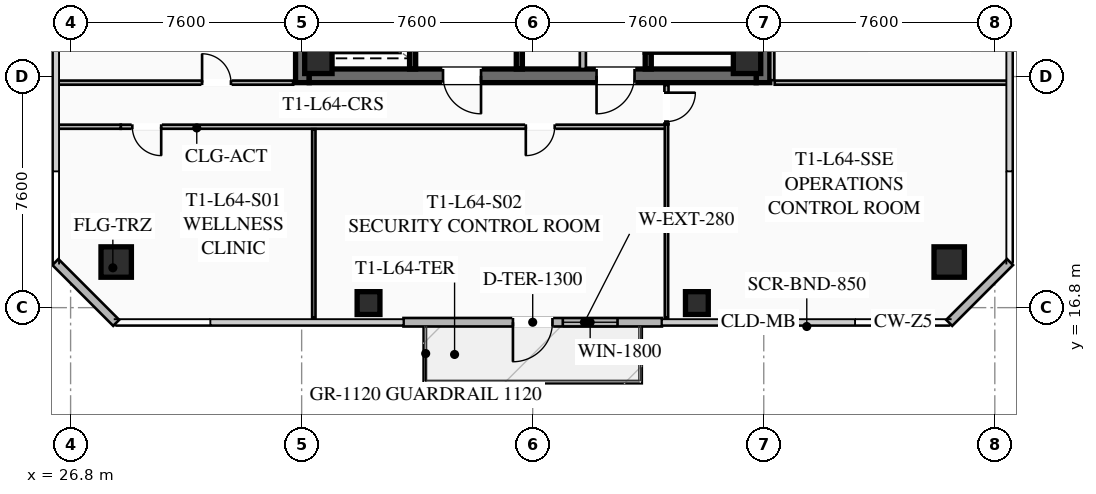
"""IFC4 building model, lengths in metres.
Left out: names, types, materials, properties, quantities, classifications, styles, units other than length and angle.
Written with IfcOpenShell. Run it as: python <this file> out.ifc"""

import sys

from ifc_helpers import new_model, si_unit, direction, frame, frame_2d, origin, origin_2d, place, context, subcontext, project, spatial, rectangle, hollow_rectangle, extrude, element, fill, save


model = new_model("IFC4")
c1 = context("Model", 3, precision=1e-05, world=origin(), true_north=direction((0.0, 1.0)))
c2 = subcontext(c1, "Body", "Model", "MODEL_VIEW")
j1 = project(units=[si_unit("LENGTHUNIT", "METRE"), si_unit("PLANEANGLEUNIT", "RADIAN")], contexts=[c1])
p1 = place(None, origin())
s1 = spatial("IfcSite", under=j1, at=p1, CompositionType="ELEMENT")
p2 = place(p1, origin())
s2 = spatial("IfcBuilding", under=s1, at=p2, CompositionType="ELEMENT")
p3 = place(p2, frame((0.0, 0.0, 236.15)))
s3 = spatial("IfcBuildingStorey", under=s2, at=p3, CompositionType="ELEMENT", Elevation=236.15)
for number, where, z_axis, x_axis in (
    (1, (34.425, 24.2, 0.0), (0.0, 0.0, 1.0), (0.0, 1.0, 0.0)),
    (2, (49.575, 39.8, 0.0), (0.0, 0.0, 1.0), (0.0, -1.0, 0.0)),
):
    element("IfcWall", number, at=place(p3, frame(where, z_axis=z_axis, x_axis=x_axis)), inside=s3, PredefinedType="SHEAR", context=c2, shape_type="SweptSolid", body=[
        extrude(rectangle(XDim=15.6, YDim=0.45, at=frame_2d((7.8, 0.0))), origin(), (0.0, 0.0, 1.0), 3.55),
    ])
p4 = place(p3, frame((49.35, 24.425, 0.0), z_axis=(0.0, 0.0, 1.0), x_axis=(-1.0, 0.0, 0.0)))
e3 = element("IfcWall", 3, at=p4, inside=s3, PredefinedType="SHEAR", context=c2, shape_type="SweptSolid", body=[
    extrude(rectangle(XDim=14.7, YDim=0.45, at=frame_2d((7.35, 0.0))), origin(), (0.0, 0.0, 1.0), 3.55),
])
p5 = place(p4, frame((9.05, 0.0, 0.0)))
e4 = element("IfcOpeningElement", 4, at=p5, cuts=e3, PredefinedType="OPENING", context=c2, shape_type="SweptSolid", body=[
    extrude(rectangle(XDim=1.25, YDim=2.25, at=frame_2d((0.625, 1.125))), frame((0.0, 0.235, 0.0), z_axis=(0.0, -1.0, 0.0), x_axis=(1.0, 0.0, 0.0)), (0.0, 0.0, 1.0), 0.47),
])
p6 = place(p4, frame((4.0, 0.0, 0.0)))
e5 = element("IfcOpeningElement", 5, at=p6, cuts=e3, PredefinedType="OPENING", context=c2, shape_type="SweptSolid", body=[
    extrude(rectangle(XDim=1.25, YDim=2.25, at=frame_2d((0.625, 1.125))), frame((0.0, 0.235, 0.0), z_axis=(0.0, -1.0, 0.0), x_axis=(1.0, 0.0, 0.0)), (0.0, 0.0, 1.0), 0.47),
])
for number, where, z_axis, x_axis in (
    (6, (34.95, 24.95, 0.0), (0.0, 0.0, 1.0), (1.0, 0.0, 0.0)),
    (7, (49.05, 24.95, 0.0), (0.0, 0.0, 1.0), (1.0, 0.0, 0.0)),
):
    element("IfcColumn", number, at=place(p3, frame(where, z_axis=z_axis, x_axis=x_axis)), inside=s3, PredefinedType="COLUMN", context=c2, shape_type="SweptSolid", body=[
        extrude(hollow_rectangle(XDim=0.9, YDim=0.9, WallThickness=0.04, at=origin_2d()), origin(), (0.0, 0.0, 1.0), 3.37),
    ])
for number, where, z_axis, x_axis in (
    (8, (28.3, 18.3, 0.0), (0.0, 0.0, 1.0), (1.0, 0.0, 0.0)),
    (9, (55.7, 18.3, 0.0), (0.0, 0.0, 1.0), (1.0, 0.0, 0.0)),
):
    element("IfcColumn", number, at=place(p3, frame(where, z_axis=z_axis, x_axis=x_axis)), inside=s3, PredefinedType="COLUMN", context=c2, shape_type="SweptSolid", body=[
        extrude(hollow_rectangle(XDim=1.0, YDim=1.0, WallThickness=0.04, at=origin_2d()), origin(), (0.0, 0.0, 1.0), 3.37),
    ])
for number, where, z_axis, x_axis in (
    (10, (36.6, 16.95, 0.0), (0.0, 0.0, 1.0), (1.0, 0.0, 0.0)),
    (11, (47.4, 16.95, 0.0), (0.0, 0.0, 1.0), (1.0, 0.0, 0.0)),
):
    element("IfcColumn", number, at=place(p3, frame(where, z_axis=z_axis, x_axis=x_axis)), inside=s3, PredefinedType="COLUMN", context=c2, shape_type="SweptSolid", body=[
        extrude(hollow_rectangle(XDim=0.75, YDim=0.75, WallThickness=0.032, at=origin_2d()), origin(), (0.0, 0.0, 1.0), 3.37),
    ])
p7 = place(p3, frame((46.25, 16.32, 0.0), z_axis=(0.0, 0.0, 1.0), x_axis=(-1.0, 0.0, 0.0)))
e12 = element("IfcWall", 12, at=p7, inside=s3, PredefinedType="SOLIDWALL", context=c2, shape_type="SweptSolid", body=[
    extrude(rectangle(XDim=8.5, YDim=0.28, at=frame_2d((4.25, 0.0))), origin(), (0.0, 0.0, 1.0), 3.37),
])
p8 = place(p7, frame((3.6, 0.0, 0.0)))
e13 = element("IfcOpeningElement", 13, at=p8, cuts=e12, PredefinedType="OPENING", context=c2, shape_type="SweptSolid", body=[
    extrude(rectangle(XDim=1.3, YDim=2.15, at=frame_2d((0.65, 1.075))), frame((0.0, 0.15, 0.0), z_axis=(0.0, -1.0, 0.0), x_axis=(1.0, 0.0, 0.0)), (0.0, 0.0, 1.0), 0.3),
])
p9 = place(p7, frame((1.46, 0.0, 0.85)))
e14 = element("IfcOpeningElement", 14, at=p9, cuts=e12, PredefinedType="OPENING", context=c2, shape_type="SweptSolid", body=[
    extrude(rectangle(XDim=1.8, YDim=1.92, at=frame_2d((0.9, 0.96))), frame((0.0, 0.15, 0.0), z_axis=(0.0, -1.0, 0.0), x_axis=(1.0, 0.0, 0.0)), (0.0, 0.0, 1.0), 0.3),
])
for number, where, z_axis, x_axis in (
    (15, (28.3, 16.3, 0.0), (0.0, 0.0, 1.0), (-0.707, 0.707, 0.0)),
    (16, (57.7, 18.3, 0.0), (0.0, 0.0, 1.0), (-0.707, -0.707, 0.0)),
):
    element("IfcWall", number, at=place(p3, frame(where, z_axis=z_axis, x_axis=x_axis)), inside=s3, PredefinedType="SOLIDWALL", context=c2, shape_type="SweptSolid", body=[
        extrude(rectangle(XDim=2.828, YDim=0.28, at=frame_2d((1.414, 0.0))), origin(), (0.0, 0.0, 1.0), 3.37),
    ])
p10 = place(p3, frame((45.8, 32.8, 0.0), z_axis=(0.0, 0.0, 1.0), x_axis=(0.0, -1.0, 0.0)))
e17 = element("IfcWall", 17, at=p10, inside=s3, PredefinedType="SHEAR", context=c2, shape_type="SweptSolid", body=[
    extrude(rectangle(XDim=8.15, YDim=0.2, at=frame_2d((4.075, 0.0))), origin(), (0.0, 0.0, 1.0), 3.37),
])
p11 = place(p10, frame((0.45, 0.0, 0.0)))
e18 = element("IfcOpeningElement", 18, at=p11, cuts=e17, PredefinedType="OPENING", context=c2, shape_type="SweptSolid", body=[
    extrude(rectangle(XDim=1.15, YDim=2.2, at=frame_2d((0.575, 1.1))), frame((0.0, 0.11, 0.0), z_axis=(0.0, -1.0, 0.0), x_axis=(1.0, 0.0, 0.0)), (0.0, 0.0, 1.0), 0.22),
])
p12 = place(p3, frame((41.56, 24.65, 0.0), z_axis=(0.0, 0.0, 1.0), x_axis=(0.0, 1.0, 0.0)))
e19 = element("IfcWall", 19, at=p12, inside=s3, PredefinedType="SHEAR", context=c2, shape_type="SweptSolid", body=[
    extrude(rectangle(XDim=14.7, YDim=0.2, at=frame_2d((7.35, 0.0))), origin(), (0.0, 0.0, 1.0), 3.37),
])
p13 = place(p3, frame((38.05, 24.65, 0.0), z_axis=(0.0, 0.0, 1.0), x_axis=(0.0, 1.0, 0.0)))
e20 = element("IfcWall", 20, at=p13, inside=s3, PredefinedType="SHEAR", context=c2, shape_type="SweptSolid", body=[
    extrude(rectangle(XDim=6.55, YDim=0.2, at=frame_2d((3.275, 0.0))), origin(), (0.0, 0.0, 1.0), 3.37),
])
p14 = place(p13, frame((4.975, 0.0, 0.0)))
e21 = element("IfcOpeningElement", 21, at=p14, cuts=e20, PredefinedType="OPENING", context=c2, shape_type="SweptSolid", body=[
    extrude(rectangle(XDim=1.3, YDim=2.25, at=frame_2d((0.65, 1.125))), frame((0.0, 0.11, 0.0), z_axis=(0.0, -1.0, 0.0), x_axis=(1.0, 0.0, 0.0)), (0.0, 0.0, 1.0), 0.22),
])
p15 = place(p13, frame((2.975, 0.0, 0.0)))
e22 = element("IfcOpeningElement", 22, at=p15, cuts=e20, PredefinedType="OPENING", context=c2, shape_type="SweptSolid", body=[
    extrude(rectangle(XDim=1.3, YDim=2.25, at=frame_2d((0.65, 1.125))), frame((0.0, 0.11, 0.0), z_axis=(0.0, -1.0, 0.0), x_axis=(1.0, 0.0, 0.0)), (0.0, 0.0, 1.0), 0.22),
])
p16 = place(p13, frame((0.775, 0.0, 0.0)))
e23 = element("IfcOpeningElement", 23, at=p16, cuts=e20, PredefinedType="OPENING", context=c2, shape_type="SweptSolid", body=[
    extrude(rectangle(XDim=1.3, YDim=2.25, at=frame_2d((0.65, 1.125))), frame((0.0, 0.11, 0.0), z_axis=(0.0, -1.0, 0.0), x_axis=(1.0, 0.0, 0.0)), (0.0, 0.0, 1.0), 0.22),
])
p17 = place(p3, frame((43.65, 24.65, 0.0), z_axis=(0.0, 0.0, 1.0), x_axis=(0.0, 1.0, 0.0)))
e24 = element("IfcWall", 24, at=p17, inside=s3, PredefinedType="SOLIDWALL", context=c2, shape_type="SweptSolid", body=[
    extrude(rectangle(XDim=7.0, YDim=0.2, at=frame_2d((3.5, 0.0))), origin(), (0.0, 0.0, 1.0), 2.723),
])
p18 = place(p17, frame((0.85, 0.0, 0.0)))
e25 = element("IfcOpeningElement", 25, at=p18, cuts=e24, PredefinedType="OPENING", context=c2, shape_type="SweptSolid", body=[
    extrude(rectangle(XDim=0.95, YDim=2.05, at=frame_2d((0.475, 1.025))), frame((0.0, 0.11, 0.0), z_axis=(0.0, -1.0, 0.0), x_axis=(1.0, 0.0, 0.0)), (0.0, 0.0, 1.0), 0.22),
])
p19 = place(p17, frame((4.8, 0.0, 0.0)))
e26 = element("IfcOpeningElement", 26, at=p19, cuts=e24, PredefinedType="OPENING", context=c2, shape_type="SweptSolid", body=[
    extrude(rectangle(XDim=1.05, YDim=2.2, at=frame_2d((0.525, 1.1))), frame((0.0, 0.11, 0.0), z_axis=(0.0, -1.0, 0.0), x_axis=(1.0, 0.0, 0.0)), (0.0, 0.0, 1.0), 0.22),
])
p20 = place(p3, frame((46.4, 22.75, 0.0), z_axis=(0.0, 0.0, 1.0), x_axis=(-1.0, 0.0, 0.0)))
e27 = element("IfcWall", 27, at=p20, inside=s3, PredefinedType="PARTITIONING", context=c2, shape_type="SweptSolid", body=[
    extrude(rectangle(XDim=17.95, YDim=0.135, at=frame_2d((8.975, 0.0))), origin(), (0.0, 0.0, 1.0), 2.723),
])
p21 = place(p20, frame((16.62, 0.0, 0.0)))
e28 = element("IfcOpeningElement", 28, at=p21, cuts=e27, PredefinedType="OPENING", context=c2, shape_type="SweptSolid", body=[
    extrude(rectangle(XDim=0.95, YDim=2.05, at=frame_2d((0.475, 1.025))), frame((0.0, 0.077, 0.0), z_axis=(0.0, -1.0, 0.0), x_axis=(1.0, 0.0, 0.0)), (0.0, 0.0, 1.0), 0.155),
])
p22 = place(p20, frame((3.677, 0.0, 0.0)))
e29 = element("IfcOpeningElement", 29, at=p22, cuts=e27, PredefinedType="OPENING", context=c2, shape_type="SweptSolid", body=[
    extrude(rectangle(XDim=0.95, YDim=2.05, at=frame_2d((0.475, 1.025))), frame((0.0, 0.077, 0.0), z_axis=(0.0, -1.0, 0.0), x_axis=(1.0, 0.0, 0.0)), (0.0, 0.0, 1.0), 0.155),
])
p23 = place(p3, frame((26.32, 22.75, 0.0), z_axis=(0.0, 0.0, 1.0), x_axis=(1.0, 0.0, 0.0)))
e30 = element("IfcWall", 30, at=p23, inside=s3, PredefinedType="PARTITIONING", context=c2, shape_type="SweptSolid", body=[
    extrude(rectangle(XDim=2.13, YDim=0.135, at=frame_2d((1.065, 0.0))), origin(), (0.0, 0.0, 1.0), 2.723),
])
p24 = place(p3, frame((46.4, 24.12, 0.0), z_axis=(0.0, 0.0, 1.0), x_axis=(0.0, -1.0, 0.0)))
e31 = element("IfcWall", 31, at=p24, inside=s3, PredefinedType="PARTITIONING", context=c2, shape_type="SweptSolid", body=[
    extrude(rectangle(XDim=1.29, YDim=0.135, at=frame_2d((0.645, 0.0))), origin(), (0.0, 0.0, 1.0), 2.723),
])
p25 = place(p24, frame((0.25, 0.0, 0.0)))
e32 = element("IfcOpeningElement", 32, at=p25, cuts=e31, PredefinedType="OPENING", context=c2, shape_type="SweptSolid", body=[
    extrude(rectangle(XDim=0.95, YDim=2.05, at=frame_2d((0.475, 1.025))), frame((0.0, 0.077, 0.0), z_axis=(0.0, -1.0, 0.0), x_axis=(1.0, 0.0, 0.0)), (0.0, 0.0, 1.0), 0.155),
])
p26 = place(p3, frame((34.8, 16.47, 0.0), z_axis=(0.0, 0.0, 1.0), x_axis=(0.0, 1.0, 0.0)))
e33 = element("IfcWall", 33, at=p26, inside=s3, PredefinedType="PARTITIONING", context=c2, shape_type="SweptSolid", body=[
    extrude(rectangle(XDim=6.2, YDim=0.11, at=frame_2d((3.1, 0.0))), origin(), (0.0, 0.0, 1.0), 2.723),
])
p27 = place(p3, frame((46.4, 16.47, 0.0), z_axis=(0.0, 0.0, 1.0), x_axis=(0.0, 1.0, 0.0)))
e34 = element("IfcWall", 34, at=p27, inside=s3, PredefinedType="PARTITIONING", context=c2, shape_type="SweptSolid", body=[
    extrude(rectangle(XDim=6.36, YDim=0.11, at=frame_2d((3.18, 0.0))), origin(), (0.0, 0.0, 1.0), 2.723),
])
p28 = place(p3, frame((49.88, 39.72, 0.0), z_axis=(0.0, 0.0, 1.0), x_axis=(0.0, -1.0, 0.0)))
e35 = element("IfcWall", 35, at=p28, inside=s3, PredefinedType="PARTITIONING", context=c2, shape_type="SweptSolid", body=[
    extrude(rectangle(XDim=15.44, YDim=0.135, at=frame_2d((7.72, 0.0))), origin(), (0.0, 0.0, 1.0), 2.723),
])
p29 = place(p3, frame((49.96, 24.2, 0.0), z_axis=(0.0, 0.0, 1.0), x_axis=(1.0, 0.0, 0.0)))
e36 = element("IfcWall", 36, at=p29, inside=s3, PredefinedType="PARTITIONING", context=c2, shape_type="SweptSolid", body=[
    extrude(rectangle(XDim=7.72, YDim=0.135, at=frame_2d((3.86, 0.0))), origin(), (0.0, 0.0, 1.0), 2.723),
])
p30 = place(p3, frame((26.32, 24.2, 0.0), z_axis=(0.0, 0.0, 1.0), x_axis=(1.0, 0.0, 0.0)))
e37 = element("IfcWall", 37, at=p30, inside=s3, PredefinedType="PARTITIONING", context=c2, shape_type="SweptSolid", body=[
    extrude(rectangle(XDim=7.8, YDim=0.135, at=frame_2d((3.9, 0.0))), origin(), (0.0, 0.0, 1.0), 2.723),
])
p31 = place(p30, frame((4.805, 0.0, 0.0)))
e38 = element("IfcOpeningElement", 38, at=p31, cuts=e37, PredefinedType="OPENING", context=c2, shape_type="SweptSolid", body=[
    extrude(rectangle(XDim=0.95, YDim=2.05, at=frame_2d((0.475, 1.025))), frame((0.0, 0.077, 0.0), z_axis=(0.0, -1.0, 0.0), x_axis=(1.0, 0.0, 0.0)), (0.0, 0.0, 1.0), 0.155),
])
p32 = place(p8, origin())
e39 = element("IfcDoor", 39, at=p32, inside=s3, OperationType="SINGLE_SWING_RIGHT", PredefinedType="DOOR", context=c2, shape_type="SweptSolid", body=[
    extrude(rectangle(XDim=1.3, YDim=2.15, at=frame_2d((0.65, 1.075))), frame((0.0, 0.025, 0.0), z_axis=(0.0, -1.0, 0.0), x_axis=(1.0, 0.0, 0.0)), (0.0, 0.0, 1.0), 0.05),
])
fill(e13, e39)
p33 = place(p9, origin())
e40 = element("IfcWindow", 40, at=p33, inside=s3, PartitioningType="SINGLE_PANEL", PredefinedType="WINDOW", context=c2, shape_type="SweptSolid", body=[
    extrude(rectangle(XDim=1.8, YDim=1.92, at=frame_2d((0.9, 0.96))), frame((0.0, 0.03, 0.0), z_axis=(0.0, -1.0, 0.0), x_axis=(1.0, 0.0, 0.0)), (0.0, 0.0, 1.0), 0.06),
])
fill(e14, e40)
p34 = place(p5, origin())
e41 = element("IfcDoor", 41, at=p34, inside=s3, OperationType="SINGLE_SWING_LEFT", PredefinedType="DOOR", context=c2, shape_type="SweptSolid", body=[
    extrude(rectangle(XDim=1.25, YDim=2.25, at=frame_2d((0.625, 1.125))), frame((0.0, 0.025, 0.0), z_axis=(0.0, -1.0, 0.0), x_axis=(1.0, 0.0, 0.0)), (0.0, 0.0, 1.0), 0.05),
])
fill(e4, e41)
p35 = place(p6, origin())
e42 = element("IfcDoor", 42, at=p35, inside=s3, OperationType="SINGLE_SWING_RIGHT", PredefinedType="DOOR", context=c2, shape_type="SweptSolid", body=[
    extrude(rectangle(XDim=1.25, YDim=2.25, at=frame_2d((0.625, 1.125))), frame((0.0, 0.025, 0.0), z_axis=(0.0, -1.0, 0.0), x_axis=(1.0, 0.0, 0.0)), (0.0, 0.0, 1.0), 0.05),
])
fill(e5, e42)
p36 = place(p21, origin())
e43 = element("IfcDoor", 43, at=p36, inside=s3, OperationType="SINGLE_SWING_LEFT", PredefinedType="DOOR", context=c2, shape_type="SweptSolid", body=[
    extrude(rectangle(XDim=0.95, YDim=2.05, at=frame_2d((0.475, 1.025))), frame((0.0, 0.025, 0.0), z_axis=(0.0, -1.0, 0.0), x_axis=(1.0, 0.0, 0.0)), (0.0, 0.0, 1.0), 0.05),
])
fill(e28, e43)
p37 = place(p22, origin())
e44 = element("IfcDoor", 44, at=p37, inside=s3, OperationType="SINGLE_SWING_RIGHT", PredefinedType="DOOR", context=c2, shape_type="SweptSolid", body=[
    extrude(rectangle(XDim=0.95, YDim=2.05, at=frame_2d((0.475, 1.025))), frame((0.0, 0.025, 0.0), z_axis=(0.0, -1.0, 0.0), x_axis=(1.0, 0.0, 0.0)), (0.0, 0.0, 1.0), 0.05),
])
fill(e29, e44)
p38 = place(p25, origin())
e45 = element("IfcDoor", 45, at=p38, inside=s3, OperationType="SINGLE_SWING_LEFT", PredefinedType="DOOR", context=c2, shape_type="SweptSolid", body=[
    extrude(rectangle(XDim=0.95, YDim=2.05, at=frame_2d((0.475, 1.025))), frame((0.0, 0.025, 0.0), z_axis=(0.0, -1.0, 0.0), x_axis=(1.0, 0.0, 0.0)), (0.0, 0.0, 1.0), 0.05),
])
fill(e32, e45)
p39 = place(p31, origin())
e46 = element("IfcDoor", 46, at=p39, inside=s3, OperationType="SINGLE_SWING_LEFT", PredefinedType="DOOR", context=c2, shape_type="SweptSolid", body=[
    extrude(rectangle(XDim=0.95, YDim=2.05, at=frame_2d((0.475, 1.025))), frame((0.0, 0.025, 0.0), z_axis=(0.0, -1.0, 0.0), x_axis=(1.0, 0.0, 0.0)), (0.0, 0.0, 1.0), 0.05),
])
fill(e38, e46)
save(model, sys.argv[1])
